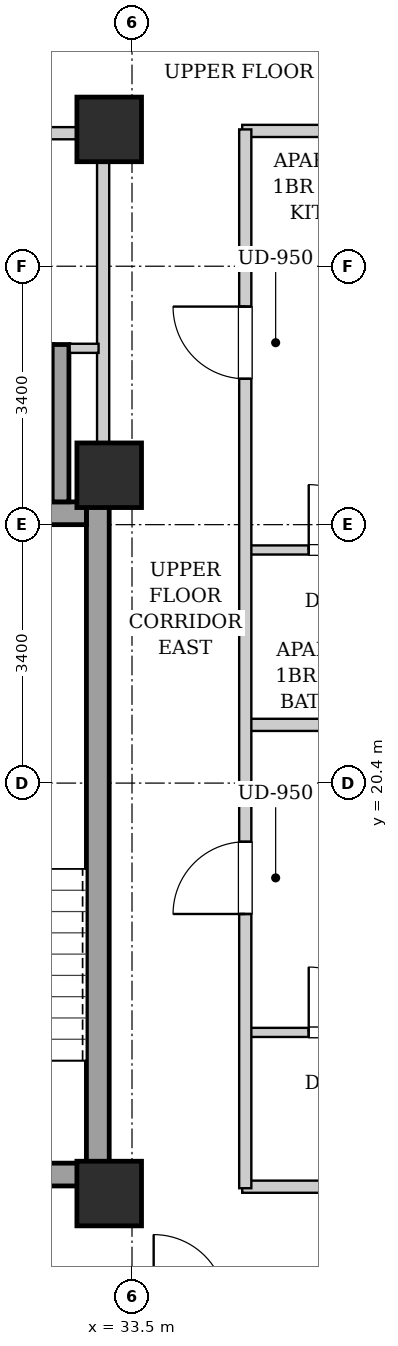
"""IFC4 building model, lengths in metres.
Left out: names, types, materials, properties, quantities, classifications, styles, units other than length and angle.
Written with IfcOpenShell. Run it as: python <this file> out.ifc"""

import sys

from ifc_helpers import new_model, si_unit, direction, frame, frame_2d, origin, origin_2d, place, context, subcontext, project, spatial, rectangle, extrude, element, fill, save


model = new_model("IFC4")
c1 = context("Model", 3, precision=1e-05, world=origin(), true_north=direction((0.0, 1.0)))
c2 = subcontext(c1, "Body", "Model", "MODEL_VIEW")
j1 = project(units=[si_unit("LENGTHUNIT", "METRE"), si_unit("PLANEANGLEUNIT", "RADIAN")], contexts=[c1])
p1 = place(None, origin())
s1 = spatial("IfcSite", under=j1, at=p1, CompositionType="ELEMENT")
p2 = place(p1, origin())
s2 = spatial("IfcBuilding", under=s1, at=p2, CompositionType="ELEMENT")
p3 = place(p2, frame((0.0, 0.0, 214.0)))
s3 = spatial("IfcBuildingStorey", under=s2, at=p3, CompositionType="ELEMENT", Elevation=214.0)
for number, where, z_axis, x_axis in (
    (1, (33.2, 15.0, 0.0), (0.0, 0.0, 1.0), (1.0, 0.0, 0.0)),
    (2, (33.2, 29.0, 0.0), (0.0, 0.0, 1.0), (1.0, 0.0, 0.0)),
    (3, (33.2, 24.45, 0.0), (0.0, 0.0, 1.0), (1.0, 0.0, 0.0)),
):
    element("IfcColumn", number, at=place(p3, frame(where, z_axis=z_axis, x_axis=x_axis)), inside=s3, PredefinedType="COLUMN", context=c2, shape_type="SweptSolid", body=[
        extrude(rectangle(XDim=0.85, YDim=0.85, at=origin_2d()), origin(), (0.0, 0.0, 1.0), 3.3),
    ])
p4 = place(p3, frame((33.05, 15.1, 0.0), z_axis=(0.0, 0.0, 1.0), x_axis=(0.0, 1.0, 0.0)))
e4 = element("IfcWall", 4, at=p4, inside=s3, PredefinedType="SHEAR", context=c2, shape_type="SweptSolid", body=[
    extrude(rectangle(XDim=9.0, YDim=0.3, at=frame_2d((4.5, 0.0))), origin(), (0.0, 0.0, 1.0), 3.04),
])
p5 = place(p3, frame((30.05, 23.95, 0.0), z_axis=(0.0, 0.0, 1.0), x_axis=(1.0, 0.0, 0.0)))
e5 = element("IfcWall", 5, at=p5, inside=s3, PredefinedType="SHEAR", context=c2, shape_type="SweptSolid", body=[
    extrude(rectangle(XDim=2.85, YDim=0.3, at=frame_2d((1.425, 0.0))), origin(), (0.0, 0.0, 1.0), 3.04),
])
p6 = place(p3, frame((30.05, 15.25, 0.0), z_axis=(0.0, 0.0, 1.0), x_axis=(1.0, 0.0, 0.0)))
e6 = element("IfcWall", 6, at=p6, inside=s3, PredefinedType="SHEAR", context=c2, shape_type="SweptSolid", body=[
    extrude(rectangle(XDim=2.85, YDim=0.3, at=frame_2d((1.425, 0.0))), origin(), (0.0, 0.0, 1.0), 3.04),
])
p7 = place(p6, frame((0.86, 0.0, 0.0)))
e7 = element("IfcOpeningElement", 7, at=p7, cuts=e6, PredefinedType="OPENING", context=c2, shape_type="SweptSolid", body=[
    extrude(rectangle(XDim=1.1, YDim=2.05, at=frame_2d((0.55, 1.025))), frame((0.0, 0.16, 0.0), z_axis=(0.0, -1.0, 0.0), x_axis=(1.0, 0.0, 0.0)), (0.0, 0.0, 1.0), 0.32),
])
p8 = place(p3, frame((32.56, 24.1, 0.0), z_axis=(0.0, 0.0, 1.0), x_axis=(0.0, 1.0, 0.0)))
e8 = element("IfcWall", 8, at=p8, inside=s3, PredefinedType="SHEAR", context=c2, shape_type="SweptSolid", body=[
    extrude(rectangle(XDim=2.07, YDim=0.22, at=frame_2d((1.035, 0.0))), origin(), (0.0, 0.0, 1.0), 3.04),
])
p9 = place(p3, frame((33.12, 24.12, 0.0), z_axis=(0.0, 0.0, 1.0), x_axis=(0.0, 1.0, 0.0)))
e9 = element("IfcWall", 9, at=p9, inside=s3, PredefinedType="PARTITIONING", context=c2, shape_type="SweptSolid", body=[
    extrude(rectangle(XDim=4.76, YDim=0.16, at=frame_2d((2.38, 0.0))), origin(), (0.0, 0.0, 1.0), 3.04),
])
p10 = place(p3, frame((32.68, 26.12, 0.0), z_axis=(0.0, 0.0, 1.0), x_axis=(1.0, 0.0, 0.0)))
e10 = element("IfcWall", 10, at=p10, inside=s3, PredefinedType="PARTITIONING", context=c2, shape_type="SweptSolid", body=[
    extrude(rectangle(XDim=0.38, YDim=0.12, at=frame_2d((0.19, 0.0))), origin(), (0.0, 0.0, 1.0), 3.04),
])
p11 = place(p3, frame((30.08, 28.95, 0.0), z_axis=(0.0, 0.0, 1.0), x_axis=(1.0, 0.0, 0.0)))
e11 = element("IfcWall", 11, at=p11, inside=s3, PredefinedType="PARTITIONING", context=c2, shape_type="SweptSolid", body=[
    extrude(rectangle(XDim=2.96, YDim=0.16, at=frame_2d((1.48, 0.0))), origin(), (0.0, 0.0, 1.0), 3.04),
])
p12 = place(p11, frame((0.695, 0.0, 0.0)))
e12 = element("IfcOpeningElement", 12, at=p12, cuts=e11, PredefinedType="OPENING", context=c2, shape_type="SweptSolid", body=[
    extrude(rectangle(XDim=0.86, YDim=2.05, at=frame_2d((0.43, 1.025))), frame((0.0, 0.09, 0.0), z_axis=(0.0, -1.0, 0.0), x_axis=(1.0, 0.0, 0.0)), (0.0, 0.0, 1.0), 0.18),
])
for number, where, z_axis, x_axis in (
    (13, (34.95, 15.09, 0.0), (0.0, 0.0, 1.0), (1.0, 0.0, 0.0)),
    (14, (34.95, 28.98, 0.0), (0.0, 0.0, 1.0), (1.0, 0.0, 0.0)),
):
    element("IfcWall", number, at=place(p3, frame(where, z_axis=z_axis, x_axis=x_axis)), inside=s3, PredefinedType="PARTITIONING", context=c2, shape_type="SweptSolid", body=[
        extrude(rectangle(XDim=5.07, YDim=0.16, at=frame_2d((2.535, 0.0))), origin(), (0.0, 0.0, 1.0), 2.556),
    ])
p13 = place(p3, frame((35.03, 21.166, 0.0), z_axis=(0.0, 0.0, 1.0), x_axis=(1.0, 0.0, 0.0)))
e15 = element("IfcWall", 15, at=p13, inside=s3, PredefinedType="PARTITIONING", context=c2, shape_type="SweptSolid", body=[
    extrude(rectangle(XDim=4.99, YDim=0.16, at=frame_2d((2.495, 0.0))), origin(), (0.0, 0.0, 1.0), 3.04),
])
p14 = place(p3, frame((35.03, 17.12, 0.0), z_axis=(0.0, 0.0, 1.0), x_axis=(1.0, 0.0, 0.0)))
e16 = element("IfcWall", 16, at=p14, inside=s3, PredefinedType="PARTITIONING", context=c2, shape_type="SweptSolid", body=[
    extrude(rectangle(XDim=2.45, YDim=0.12, at=frame_2d((1.225, 0.0))), origin(), (0.0, 0.0, 1.0), 3.04),
])
p15 = place(p14, frame((0.795, 0.0, 0.0)))
e17 = element("IfcOpeningElement", 17, at=p15, cuts=e16, PredefinedType="OPENING", context=c2, shape_type="SweptSolid", body=[
    extrude(rectangle(XDim=0.86, YDim=2.05, at=frame_2d((0.43, 1.025))), frame((0.0, 0.07, 0.0), z_axis=(0.0, -1.0, 0.0), x_axis=(1.0, 0.0, 0.0)), (0.0, 0.0, 1.0), 0.14),
])
p16 = place(p3, frame((35.03, 23.467, 0.0), z_axis=(0.0, 0.0, 1.0), x_axis=(1.0, 0.0, 0.0)))
e18 = element("IfcWall", 18, at=p16, inside=s3, PredefinedType="PARTITIONING", context=c2, shape_type="SweptSolid", body=[
    extrude(rectangle(XDim=2.45, YDim=0.12, at=frame_2d((1.225, 0.0))), origin(), (0.0, 0.0, 1.0), 3.04),
])
p17 = place(p16, frame((0.795, 0.0, 0.0)))
e19 = element("IfcOpeningElement", 19, at=p17, cuts=e18, PredefinedType="OPENING", context=c2, shape_type="SweptSolid", body=[
    extrude(rectangle(XDim=0.86, YDim=2.05, at=frame_2d((0.43, 1.025))), frame((0.0, 0.07, 0.0), z_axis=(0.0, -1.0, 0.0), x_axis=(1.0, 0.0, 0.0)), (0.0, 0.0, 1.0), 0.14),
])
p18 = place(p3, frame((34.99, 15.07, 0.0), z_axis=(0.0, 0.0, 1.0), x_axis=(0.0, 1.0, 0.0)))
e20 = element("IfcWall", 20, at=p18, inside=s3, PredefinedType="PARTITIONING", context=c2, shape_type="SweptSolid", body=[
    extrude(rectangle(XDim=13.93, YDim=0.16, at=frame_2d((6.965, 0.0))), origin(), (0.0, 0.0, 1.0), 3.04),
])
p19 = place(p18, frame((3.608, 0.0, 0.0)))
e21 = element("IfcOpeningElement", 21, at=p19, cuts=e20, PredefinedType="OPENING", context=c2, shape_type="SweptSolid", body=[
    extrude(rectangle(XDim=0.95, YDim=2.1, at=frame_2d((0.475, 1.05))), frame((0.0, 0.09, 0.0), z_axis=(0.0, -1.0, 0.0), x_axis=(1.0, 0.0, 0.0)), (0.0, 0.0, 1.0), 0.18),
])
p20 = place(p18, frame((10.649, 0.0, 0.0)))
e22 = element("IfcOpeningElement", 22, at=p20, cuts=e20, PredefinedType="OPENING", context=c2, shape_type="SweptSolid", body=[
    extrude(rectangle(XDim=0.95, YDim=2.1, at=frame_2d((0.475, 1.05))), frame((0.0, 0.09, 0.0), z_axis=(0.0, -1.0, 0.0), x_axis=(1.0, 0.0, 0.0)), (0.0, 0.0, 1.0), 0.18),
])
p21 = place(p15, origin())
e23 = element("IfcDoor", 23, at=p21, inside=s3, OperationType="SINGLE_SWING_LEFT", PredefinedType="DOOR", context=c2, shape_type="SweptSolid", body=[
    extrude(rectangle(XDim=0.86, YDim=2.05, at=frame_2d((0.43, 1.025))), frame((0.0, 0.025, 0.0), z_axis=(0.0, -1.0, 0.0), x_axis=(1.0, 0.0, 0.0)), (0.0, 0.0, 1.0), 0.05),
])
fill(e17, e23)
p22 = place(p17, origin())
e24 = element("IfcDoor", 24, at=p22, inside=s3, OperationType="SINGLE_SWING_LEFT", PredefinedType="DOOR", context=c2, shape_type="SweptSolid", body=[
    extrude(rectangle(XDim=0.86, YDim=2.05, at=frame_2d((0.43, 1.025))), frame((0.0, 0.025, 0.0), z_axis=(0.0, -1.0, 0.0), x_axis=(1.0, 0.0, 0.0)), (0.0, 0.0, 1.0), 0.05),
])
fill(e19, e24)
p23 = place(p19, origin())
e25 = element("IfcDoor", 25, at=p23, inside=s3, OperationType="SINGLE_SWING_LEFT", PredefinedType="DOOR", context=c2, shape_type="SweptSolid", body=[
    extrude(rectangle(XDim=0.95, YDim=2.1, at=frame_2d((0.475, 1.05))), frame((0.0, 0.025, 0.0), z_axis=(0.0, -1.0, 0.0), x_axis=(1.0, 0.0, 0.0)), (0.0, 0.0, 1.0), 0.05),
])
fill(e21, e25)
p24 = place(p20, origin())
e26 = element("IfcDoor", 26, at=p24, inside=s3, OperationType="SINGLE_SWING_RIGHT", PredefinedType="DOOR", context=c2, shape_type="SweptSolid", body=[
    extrude(rectangle(XDim=0.95, YDim=2.1, at=frame_2d((0.475, 1.05))), frame((0.0, 0.025, 0.0), z_axis=(0.0, -1.0, 0.0), x_axis=(1.0, 0.0, 0.0)), (0.0, 0.0, 1.0), 0.05),
])
fill(e22, e26)
save(model, sys.argv[1])
